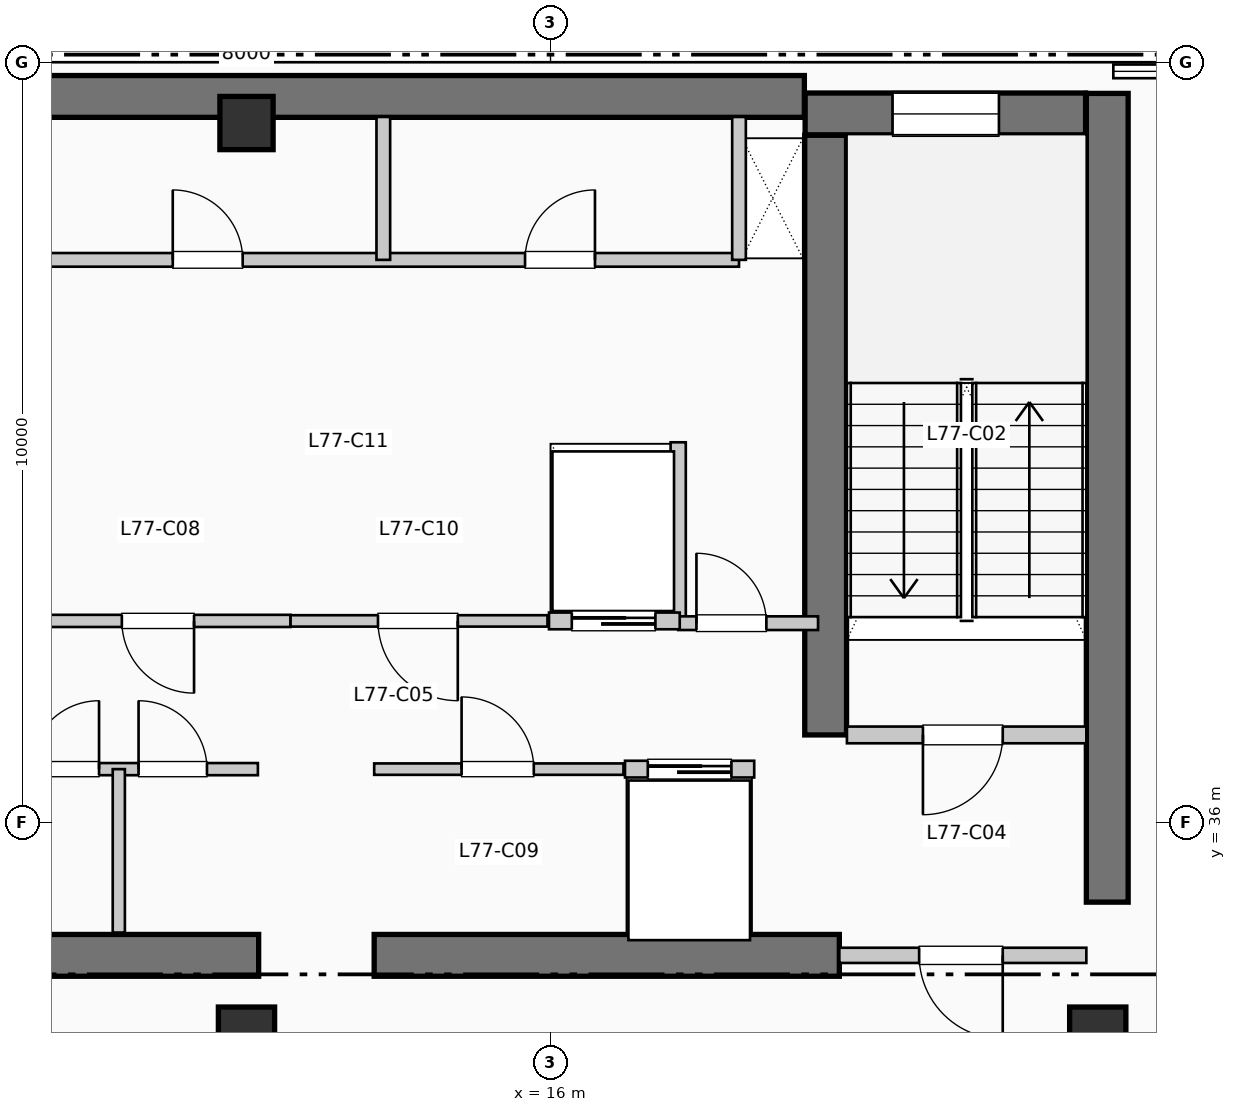
"""IFC4 building model, lengths in metres.
Left out: names, types, materials, properties, quantities, classifications, styles, units other than length and angle.
Written with IfcOpenShell. Run it as: python <this file> out.ifc"""

import sys

from ifc_helpers import new_model, si_unit, direction, frame, frame_2d, origin, origin_2d, place, context, subcontext, project, spatial, rectangle, extrude, element, fill, save


model = new_model("IFC4")
c1 = context("Model", 3, precision=1e-05, world=origin(), true_north=direction((0.0, 1.0)))
c2 = subcontext(c1, "Body", "Model", "MODEL_VIEW")
j1 = project(units=[si_unit("LENGTHUNIT", "METRE"), si_unit("PLANEANGLEUNIT", "RADIAN")], contexts=[c1])
p1 = place(None, origin())
s1 = spatial("IfcSite", under=j1, at=p1, CompositionType="ELEMENT")
p2 = place(p1, origin())
s2 = spatial("IfcBuilding", under=s1, at=p2, CompositionType="ELEMENT")
p3 = place(p2, frame((0.0, 0.0, 315.81)))
s3 = spatial("IfcBuildingStorey", under=s2, at=p3, CompositionType="ELEMENT", Elevation=315.81)
p4 = place(p3, frame((5.36, 45.55, 0.0), z_axis=(0.0, 0.0, 1.0), x_axis=(1.0, 0.0, 0.0)))
e1 = element("IfcWall", 1, at=p4, inside=s3, PredefinedType="SHEAR", context=c2, shape_type="SweptSolid", body=[
    extrude(rectangle(XDim=13.98, YDim=0.55, at=frame_2d((6.99, 0.0))), origin(), (0.0, 0.0, 1.0), 3.96),
])
p5 = place(p3, frame((23.325, 34.95, 0.0), z_axis=(0.0, 0.0, 1.0), x_axis=(0.0, 1.0, 0.0)))
e2 = element("IfcWall", 2, at=p5, inside=s3, PredefinedType="SHEAR", context=c2, shape_type="SweptSolid", body=[
    extrude(rectangle(XDim=10.64, YDim=0.55, at=frame_2d((5.32, 0.0))), origin(), (0.0, 0.0, 1.0), 3.96),
])
p6 = place(p3, frame((1.45, 34.25, 0.0), z_axis=(0.0, 0.0, 1.0), x_axis=(1.0, 0.0, 0.0)))
e3 = element("IfcWall", 3, at=p6, inside=s3, PredefinedType="SHEAR", context=c2, shape_type="SweptSolid", body=[
    extrude(rectangle(XDim=10.71, YDim=0.55, at=frame_2d((5.355, 0.0))), origin(), (0.0, 0.0, 1.0), 3.96),
])
p7 = place(p6, frame((7.25, 0.0, 0.0), z_axis=(0.0, 0.0, 1.0), x_axis=(-1.0, 0.0, 0.0)))
e4 = element("IfcOpeningElement", 4, at=p7, cuts=e3, PredefinedType="OPENING", context=c2, shape_type="SweptSolid", body=[
    extrude(rectangle(XDim=1.1, YDim=2.15, at=frame_2d((0.55, 1.075))), frame((0.0, 0.285, 0.0), z_axis=(0.0, -1.0, 0.0), x_axis=(1.0, 0.0, 0.0)), (0.0, 0.0, 1.0), 0.57),
])
p8 = place(p3, frame((13.68, 34.25, 0.0), z_axis=(0.0, 0.0, 1.0), x_axis=(1.0, 0.0, 0.0)))
e5 = element("IfcWall", 5, at=p8, inside=s3, PredefinedType="SHEAR", context=c2, shape_type="SweptSolid", body=[
    extrude(rectangle(XDim=6.12, YDim=0.55, at=frame_2d((3.06, 0.0))), origin(), (0.0, 0.0, 1.0), 3.96),
])
p9 = place(p3, frame((19.62, 37.15, 0.0), z_axis=(0.0, 0.0, 1.0), x_axis=(0.0, 1.0, 0.0)))
e6 = element("IfcWall", 6, at=p9, inside=s3, PredefinedType="SHEAR", context=c2, shape_type="SweptSolid", body=[
    extrude(rectangle(XDim=7.89, YDim=0.55, at=frame_2d((3.945, 0.0))), origin(), (0.0, 0.0, 1.0), 3.96),
])
p10 = place(p3, frame((19.35, 45.32, 0.0), z_axis=(0.0, 0.0, 1.0), x_axis=(1.0, 0.0, 0.0)))
e7 = element("IfcWall", 7, at=p10, inside=s3, PredefinedType="SHEAR", context=c2, shape_type="SweptSolid", body=[
    extrude(rectangle(XDim=3.69, YDim=0.55, at=frame_2d((1.845, 0.0))), origin(), (0.0, 0.0, 1.0), 3.96),
])
p11 = place(p10, frame((1.15, 0.0, 1.05)))
e8 = element("IfcOpeningElement", 8, at=p11, cuts=e7, PredefinedType="OPENING", context=c2, shape_type="SweptSolid", body=[
    extrude(rectangle(XDim=1.4, YDim=1.8, at=frame_2d((0.7, 0.9))), frame((0.0, 0.285, 0.0), z_axis=(0.0, -1.0, 0.0), x_axis=(1.0, 0.0, 0.0)), (0.0, 0.0, 1.0), 0.57),
])
p12 = place(p3, frame((12.0, 33.2, 0.0), z_axis=(0.0, 0.0, 1.0), x_axis=(1.0, 0.0, 0.0)))
e9 = element("IfcColumn", 9, at=p12, inside=s3, PredefinedType="COLUMN", context=c2, shape_type="SweptSolid", body=[
    extrude(rectangle(XDim=0.74, YDim=0.74, at=origin_2d()), origin(), (0.0, 0.0, 1.0), 3.96),
])
p13 = place(p3, frame((12.0, 45.2, 0.0), z_axis=(0.0, 0.0, 1.0), x_axis=(1.0, 0.0, 0.0)))
e10 = element("IfcColumn", 10, at=p13, inside=s3, PredefinedType="COLUMN", context=c2, shape_type="SweptSolid", body=[
    extrude(rectangle(XDim=0.7, YDim=0.7, at=origin_2d()), origin(), (0.0, 0.0, 1.0), 3.96),
])
p14 = place(p3, frame((23.2, 33.2, 0.0), z_axis=(0.0, 0.0, 1.0), x_axis=(1.0, 0.0, 0.0)))
e11 = element("IfcColumn", 11, at=p14, inside=s3, PredefinedType="COLUMN", context=c2, shape_type="SweptSolid", body=[
    extrude(rectangle(XDim=0.74, YDim=0.74, at=origin_2d()), origin(), (0.0, 0.0, 1.0), 3.96),
])
p15 = place(p3, frame((19.9, 37.15, 0.0), z_axis=(0.0, 0.0, 1.0), x_axis=(1.0, 0.0, 0.0)))
e12 = element("IfcWall", 12, at=p15, inside=s3, PredefinedType="PARTITIONING", context=c2, shape_type="SweptSolid", body=[
    extrude(rectangle(XDim=3.15, YDim=0.22, at=frame_2d((1.575, 0.0))), origin(), (0.0, 0.0, 1.0), 3.74),
])
p16 = place(p15, frame((2.05, 0.0, 0.0), z_axis=(0.0, 0.0, 1.0), x_axis=(-1.0, 0.0, 0.0)))
e13 = element("IfcOpeningElement", 13, at=p16, cuts=e12, PredefinedType="OPENING", context=c2, shape_type="SweptSolid", body=[
    extrude(rectangle(XDim=1.05, YDim=2.15, at=frame_2d((0.525, 1.075))), frame((0.0, 0.12, 0.0), z_axis=(0.0, -1.0, 0.0), x_axis=(1.0, 0.0, 0.0)), (0.0, 0.0, 1.0), 0.24),
])
p17 = place(p3, frame((19.8, 34.25, 0.0), z_axis=(0.0, 0.0, 1.0), x_axis=(1.0, 0.0, 0.0)))
e14 = element("IfcWall", 14, at=p17, inside=s3, PredefinedType="PARTITIONING", context=c2, shape_type="SweptSolid", body=[
    extrude(rectangle(XDim=3.25, YDim=0.2, at=frame_2d((1.625, 0.0))), origin(), (0.0, 0.0, 1.0), 3.74),
])
p18 = place(p17, frame((2.15, 0.0, 0.0), z_axis=(0.0, 0.0, 1.0), x_axis=(-1.0, 0.0, 0.0)))
e15 = element("IfcOpeningElement", 15, at=p18, cuts=e14, PredefinedType="OPENING", context=c2, shape_type="SweptSolid", body=[
    extrude(rectangle(XDim=1.1, YDim=2.15, at=frame_2d((0.55, 1.075))), frame((0.0, 0.11, 0.0), z_axis=(0.0, -1.0, 0.0), x_axis=(1.0, 0.0, 0.0)), (0.0, 0.0, 1.0), 0.22),
])
p19 = place(p3, frame((17.68, 38.65, 0.0), z_axis=(0.0, 0.0, 1.0), x_axis=(0.0, 1.0, 0.0)))
e16 = element("IfcWall", 16, at=p19, inside=s3, PredefinedType="PARTITIONING", context=c2, shape_type="SweptSolid", body=[
    extrude(rectangle(XDim=2.35, YDim=0.2, at=frame_2d((1.175, 0.0))), origin(), (0.0, 0.0, 1.0), 3.74),
])
p20 = place(p3, frame((17.68, 38.62, 0.0), z_axis=(0.0, 0.0, 1.0), x_axis=(1.0, 0.0, 0.0)))
e17 = element("IfcWall", 17, at=p20, inside=s3, PredefinedType="PARTITIONING", context=c2, shape_type="SweptSolid", body=[
    extrude(rectangle(XDim=1.84, YDim=0.18, at=frame_2d((0.92, 0.0))), origin(), (0.0, 0.0, 1.0), 3.74),
])
p21 = place(p20, frame((0.24, 0.0, 0.0)))
e18 = element("IfcOpeningElement", 18, at=p21, cuts=e17, PredefinedType="OPENING", context=c2, shape_type="SweptSolid", body=[
    extrude(rectangle(XDim=0.92, YDim=2.1, at=frame_2d((0.46, 1.05))), frame((0.0, 0.1, 0.0), z_axis=(0.0, -1.0, 0.0), x_axis=(1.0, 0.0, 0.0)), (0.0, 0.0, 1.0), 0.2),
])
p22 = place(p3, frame((8.9, 36.7, 0.0), z_axis=(0.0, 0.0, 1.0), x_axis=(1.0, 0.0, 0.0)))
e19 = element("IfcWall", 19, at=p22, inside=s3, PredefinedType="PARTITIONING", context=c2, shape_type="SweptSolid", body=[
    extrude(rectangle(XDim=3.25, YDim=0.16, at=frame_2d((1.625, 0.0))), origin(), (0.0, 0.0, 1.0), 3.74),
])
p23 = place(p22, frame((0.26, 0.0, 0.0)))
e20 = element("IfcOpeningElement", 20, at=p23, cuts=e19, PredefinedType="OPENING", context=c2, shape_type="SweptSolid", body=[
    extrude(rectangle(XDim=0.9, YDim=2.15, at=frame_2d((0.45, 1.075))), frame((0.0, 0.09, 0.0), z_axis=(0.0, -1.0, 0.0), x_axis=(1.0, 0.0, 0.0)), (0.0, 0.0, 1.0), 0.18),
])
p24 = place(p22, frame((1.68, 0.0, 0.0)))
e21 = element("IfcOpeningElement", 21, at=p24, cuts=e19, PredefinedType="OPENING", context=c2, shape_type="SweptSolid", body=[
    extrude(rectangle(XDim=0.9, YDim=2.15, at=frame_2d((0.45, 1.075))), frame((0.0, 0.09, 0.0), z_axis=(0.0, -1.0, 0.0), x_axis=(1.0, 0.0, 0.0)), (0.0, 0.0, 1.0), 0.18),
])
p25 = place(p3, frame((10.32, 34.55, 0.0), z_axis=(0.0, 0.0, 1.0), x_axis=(0.0, 1.0, 0.0)))
e22 = element("IfcWall", 22, at=p25, inside=s3, PredefinedType="PARTITIONING", context=c2, shape_type="SweptSolid", body=[
    extrude(rectangle(XDim=2.15, YDim=0.16, at=frame_2d((1.075, 0.0))), origin(), (0.0, 0.0, 1.0), 3.74),
])
p26 = place(p3, frame((9.16, 38.65, 0.0), z_axis=(0.0, 0.0, 1.0), x_axis=(1.0, 0.0, 0.0)))
e23 = element("IfcWall", 23, at=p26, inside=s3, PredefinedType="PARTITIONING", context=c2, shape_type="SweptSolid", body=[
    extrude(rectangle(XDim=3.42, YDim=0.16, at=frame_2d((1.71, 0.0))), origin(), (0.0, 0.0, 1.0), 3.74),
])
p27 = place(p26, frame((2.15, 0.0, 0.0), z_axis=(0.0, 0.0, 1.0), x_axis=(-1.0, 0.0, 0.0)))
e24 = element("IfcOpeningElement", 24, at=p27, cuts=e23, PredefinedType="OPENING", context=c2, shape_type="SweptSolid", body=[
    extrude(rectangle(XDim=0.95, YDim=2.15, at=frame_2d((0.475, 1.075))), frame((0.0, 0.09, 0.0), z_axis=(0.0, -1.0, 0.0), x_axis=(1.0, 0.0, 0.0)), (0.0, 0.0, 1.0), 0.18),
])
p28 = place(p3, frame((13.68, 36.7, 0.0), z_axis=(0.0, 0.0, 1.0), x_axis=(1.0, 0.0, 0.0)))
e25 = element("IfcWall", 25, at=p28, inside=s3, PredefinedType="PARTITIONING", context=c2, shape_type="SweptSolid", body=[
    extrude(rectangle(XDim=3.28, YDim=0.15, at=frame_2d((1.64, 0.0))), origin(), (0.0, 0.0, 1.0), 3.74),
])
p29 = place(p28, frame((1.15, 0.0, 0.0)))
e26 = element("IfcOpeningElement", 26, at=p29, cuts=e25, PredefinedType="OPENING", context=c2, shape_type="SweptSolid", body=[
    extrude(rectangle(XDim=0.95, YDim=2.15, at=frame_2d((0.475, 1.075))), frame((0.0, 0.085, 0.0), z_axis=(0.0, -1.0, 0.0), x_axis=(1.0, 0.0, 0.0)), (0.0, 0.0, 1.0), 0.17),
])
p30 = place(p3, frame((12.58, 38.65, 0.0), z_axis=(0.0, 0.0, 1.0), x_axis=(1.0, 0.0, 0.0)))
e27 = element("IfcWall", 27, at=p30, inside=s3, PredefinedType="PARTITIONING", context=c2, shape_type="SweptSolid", body=[
    extrude(rectangle(XDim=3.38, YDim=0.15, at=frame_2d((1.69, 0.0))), origin(), (0.0, 0.0, 1.0), 3.74),
])
p31 = place(p30, frame((2.2, 0.0, 0.0), z_axis=(0.0, 0.0, 1.0), x_axis=(-1.0, 0.0, 0.0)))
e28 = element("IfcOpeningElement", 28, at=p31, cuts=e27, PredefinedType="OPENING", context=c2, shape_type="SweptSolid", body=[
    extrude(rectangle(XDim=1.05, YDim=2.15, at=frame_2d((0.525, 1.075))), frame((0.0, 0.085, 0.0), z_axis=(0.0, -1.0, 0.0), x_axis=(1.0, 0.0, 0.0)), (0.0, 0.0, 1.0), 0.17),
])
p32 = place(p3, frame((16.98, 36.7, 0.0), z_axis=(0.0, 0.0, 1.0), x_axis=(1.0, 0.0, 0.0)))
e29 = element("IfcWall", 29, at=p32, inside=s3, PredefinedType="PARTITIONING", context=c2, shape_type="SweptSolid", body=[
    extrude(rectangle(XDim=1.7, YDim=0.22, at=frame_2d((0.85, 0.0))), origin(), (0.0, 0.0, 1.0), 3.74),
])
p33 = place(p32, frame((0.3, 0.0, 0.0)))
e30 = element("IfcOpeningElement", 30, at=p33, cuts=e29, PredefinedType="OPENING", context=c2, shape_type="SweptSolid", body=[
    extrude(rectangle(XDim=1.1, YDim=2.2, at=frame_2d((0.55, 1.1))), frame((0.0, 0.12, 0.0), z_axis=(0.0, -1.0, 0.0), x_axis=(1.0, 0.0, 0.0)), (0.0, 0.0, 1.0), 0.24),
])
p34 = place(p3, frame((15.98, 38.65, 0.0), z_axis=(0.0, 0.0, 1.0), x_axis=(1.0, 0.0, 0.0)))
e31 = element("IfcWall", 31, at=p34, inside=s3, PredefinedType="PARTITIONING", context=c2, shape_type="SweptSolid", body=[
    extrude(rectangle(XDim=1.72, YDim=0.22, at=frame_2d((0.86, 0.0))), origin(), (0.0, 0.0, 1.0), 3.74),
])
p35 = place(p34, frame((0.3, 0.0, 0.0)))
e32 = element("IfcOpeningElement", 32, at=p35, cuts=e31, PredefinedType="OPENING", context=c2, shape_type="SweptSolid", body=[
    extrude(rectangle(XDim=1.1, YDim=2.2, at=frame_2d((0.55, 1.1))), frame((0.0, 0.12, 0.0), z_axis=(0.0, -1.0, 0.0), x_axis=(1.0, 0.0, 0.0)), (0.0, 0.0, 1.0), 0.24),
])
p36 = place(p3, frame((9.15, 43.4, 0.0), z_axis=(0.0, 0.0, 1.0), x_axis=(1.0, 0.0, 0.0)))
e33 = element("IfcWall", 33, at=p36, inside=s3, PredefinedType="PLUMBINGWALL", context=c2, shape_type="SweptSolid", body=[
    extrude(rectangle(XDim=9.33, YDim=0.18, at=frame_2d((4.665, 0.0))), origin(), (0.0, 0.0, 1.0), 3.74),
])
p37 = place(p36, frame((1.88, 0.0, 0.0)))
e34 = element("IfcOpeningElement", 34, at=p37, cuts=e33, PredefinedType="OPENING", context=c2, shape_type="SweptSolid", body=[
    extrude(rectangle(XDim=0.92, YDim=2.1, at=frame_2d((0.46, 1.05))), frame((0.0, 0.1, 0.0), z_axis=(0.0, -1.0, 0.0), x_axis=(1.0, 0.0, 0.0)), (0.0, 0.0, 1.0), 0.2),
])
p38 = place(p36, frame((6.515, 0.0, 0.0)))
e35 = element("IfcOpeningElement", 35, at=p38, cuts=e33, PredefinedType="OPENING", context=c2, shape_type="SweptSolid", body=[
    extrude(rectangle(XDim=0.92, YDim=2.1, at=frame_2d((0.46, 1.05))), frame((0.0, 0.1, 0.0), z_axis=(0.0, -1.0, 0.0), x_axis=(1.0, 0.0, 0.0)), (0.0, 0.0, 1.0), 0.2),
])
for number, where, z_axis, x_axis in (
    (36, (18.48, 43.4, 0.0), (0.0, 0.0, 1.0), (0.0, 1.0, 0.0)),
    (37, (13.8, 43.4, 0.0), (0.0, 0.0, 1.0), (0.0, 1.0, 0.0)),
):
    element("IfcWall", number, at=place(p3, frame(where, z_axis=z_axis, x_axis=x_axis)), inside=s3, PredefinedType="PLUMBINGWALL", context=c2, shape_type="SweptSolid", body=[
        extrude(rectangle(XDim=1.88, YDim=0.18, at=frame_2d((0.94, 0.0))), origin(), (0.0, 0.0, 1.0), 3.74),
    ])
p39 = place(p11, origin())
e38 = element("IfcWindow", 38, at=p39, inside=s3, PartitioningType="SINGLE_PANEL", PredefinedType="WINDOW", context=c2, shape_type="SweptSolid", body=[
    extrude(rectangle(XDim=1.4, YDim=1.8, at=frame_2d((0.7, 0.9))), frame((0.0, 0.03, 0.0), z_axis=(0.0, -1.0, 0.0), x_axis=(1.0, 0.0, 0.0)), (0.0, 0.0, 1.0), 0.06),
])
fill(e8, e38)
p40 = place(p16, origin())
e39 = element("IfcDoor", 39, at=p40, inside=s3, OperationType="SINGLE_SWING_LEFT", PredefinedType="DOOR", context=c2, shape_type="SweptSolid", body=[
    extrude(rectangle(XDim=1.05, YDim=2.15, at=frame_2d((0.525, 1.075))), frame((0.0, 0.025, 0.0), z_axis=(0.0, -1.0, 0.0), x_axis=(1.0, 0.0, 0.0)), (0.0, 0.0, 1.0), 0.05),
])
fill(e13, e39)
p41 = place(p18, origin())
e40 = element("IfcDoor", 40, at=p41, inside=s3, OperationType="SINGLE_SWING_RIGHT", PredefinedType="DOOR", context=c2, shape_type="SweptSolid", body=[
    extrude(rectangle(XDim=1.1, YDim=2.15, at=frame_2d((0.55, 1.075))), frame((0.0, 0.025, 0.0), z_axis=(0.0, -1.0, 0.0), x_axis=(1.0, 0.0, 0.0)), (0.0, 0.0, 1.0), 0.05),
])
fill(e15, e40)
p42 = place(p21, origin())
e41 = element("IfcDoor", 41, at=p42, inside=s3, OperationType="SINGLE_SWING_LEFT", PredefinedType="DOOR", context=c2, shape_type="SweptSolid", body=[
    extrude(rectangle(XDim=0.92, YDim=2.1, at=frame_2d((0.46, 1.05))), frame((0.0, 0.025, 0.0), z_axis=(0.0, -1.0, 0.0), x_axis=(1.0, 0.0, 0.0)), (0.0, 0.0, 1.0), 0.05),
])
fill(e18, e41)
p43 = place(p23, origin())
e42 = element("IfcDoor", 42, at=p43, inside=s3, OperationType="SINGLE_SWING_RIGHT", PredefinedType="DOOR", context=c2, shape_type="SweptSolid", body=[
    extrude(rectangle(XDim=0.9, YDim=2.15, at=frame_2d((0.45, 1.075))), frame((0.0, 0.025, 0.0), z_axis=(0.0, -1.0, 0.0), x_axis=(1.0, 0.0, 0.0)), (0.0, 0.0, 1.0), 0.05),
])
fill(e20, e42)
p44 = place(p24, origin())
e43 = element("IfcDoor", 43, at=p44, inside=s3, OperationType="SINGLE_SWING_LEFT", PredefinedType="DOOR", context=c2, shape_type="SweptSolid", body=[
    extrude(rectangle(XDim=0.9, YDim=2.15, at=frame_2d((0.45, 1.075))), frame((0.0, 0.025, 0.0), z_axis=(0.0, -1.0, 0.0), x_axis=(1.0, 0.0, 0.0)), (0.0, 0.0, 1.0), 0.05),
])
fill(e21, e43)
p45 = place(p27, origin())
e44 = element("IfcDoor", 44, at=p45, inside=s3, OperationType="SINGLE_SWING_RIGHT", PredefinedType="DOOR", context=c2, shape_type="SweptSolid", body=[
    extrude(rectangle(XDim=0.95, YDim=2.15, at=frame_2d((0.475, 1.075))), frame((0.0, 0.025, 0.0), z_axis=(0.0, -1.0, 0.0), x_axis=(1.0, 0.0, 0.0)), (0.0, 0.0, 1.0), 0.05),
])
fill(e24, e44)
p46 = place(p29, origin())
e45 = element("IfcDoor", 45, at=p46, inside=s3, OperationType="SINGLE_SWING_LEFT", PredefinedType="DOOR", context=c2, shape_type="SweptSolid", body=[
    extrude(rectangle(XDim=0.95, YDim=2.15, at=frame_2d((0.475, 1.075))), frame((0.0, 0.025, 0.0), z_axis=(0.0, -1.0, 0.0), x_axis=(1.0, 0.0, 0.0)), (0.0, 0.0, 1.0), 0.05),
])
fill(e26, e45)
p47 = place(p31, origin())
e46 = element("IfcDoor", 46, at=p47, inside=s3, OperationType="SINGLE_SWING_RIGHT", PredefinedType="DOOR", context=c2, shape_type="SweptSolid", body=[
    extrude(rectangle(XDim=1.05, YDim=2.15, at=frame_2d((0.525, 1.075))), frame((0.0, 0.025, 0.0), z_axis=(0.0, -1.0, 0.0), x_axis=(1.0, 0.0, 0.0)), (0.0, 0.0, 1.0), 0.05),
])
fill(e28, e46)
p48 = place(p33, origin())
e47 = element("IfcDoor", 47, at=p48, inside=s3, OperationType="SLIDING_TO_LEFT", PredefinedType="DOOR", context=c2, shape_type="SweptSolid", body=[
    extrude(rectangle(XDim=1.1, YDim=2.2, at=frame_2d((0.55, 1.1))), frame((0.0, 0.025, 0.0), z_axis=(0.0, -1.0, 0.0), x_axis=(1.0, 0.0, 0.0)), (0.0, 0.0, 1.0), 0.05),
])
fill(e30, e47)
p49 = place(p35, origin())
e48 = element("IfcDoor", 48, at=p49, inside=s3, OperationType="SLIDING_TO_LEFT", PredefinedType="DOOR", context=c2, shape_type="SweptSolid", body=[
    extrude(rectangle(XDim=1.1, YDim=2.2, at=frame_2d((0.55, 1.1))), frame((0.0, 0.025, 0.0), z_axis=(0.0, -1.0, 0.0), x_axis=(1.0, 0.0, 0.0)), (0.0, 0.0, 1.0), 0.05),
])
fill(e32, e48)
p50 = place(p37, origin())
e49 = element("IfcDoor", 49, at=p50, inside=s3, OperationType="SINGLE_SWING_LEFT", PredefinedType="DOOR", context=c2, shape_type="SweptSolid", body=[
    extrude(rectangle(XDim=0.92, YDim=2.1, at=frame_2d((0.46, 1.05))), frame((0.0, 0.025, 0.0), z_axis=(0.0, -1.0, 0.0), x_axis=(1.0, 0.0, 0.0)), (0.0, 0.0, 1.0), 0.05),
])
fill(e34, e49)
p51 = place(p38, origin())
e50 = element("IfcDoor", 50, at=p51, inside=s3, OperationType="SINGLE_SWING_RIGHT", PredefinedType="DOOR", context=c2, shape_type="SweptSolid", body=[
    extrude(rectangle(XDim=0.92, YDim=2.1, at=frame_2d((0.46, 1.05))), frame((0.0, 0.025, 0.0), z_axis=(0.0, -1.0, 0.0), x_axis=(1.0, 0.0, 0.0)), (0.0, 0.0, 1.0), 0.05),
])
fill(e35, e50)
save(model, sys.argv[1])
